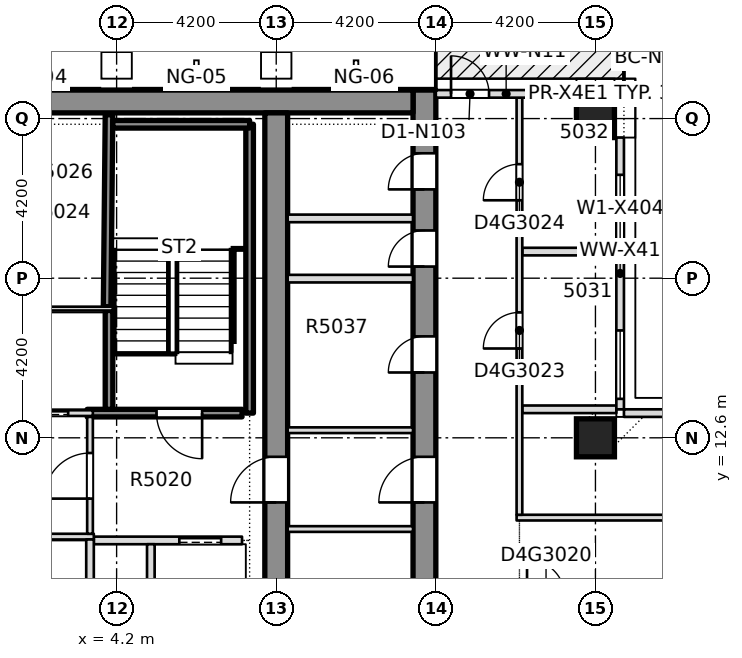
"""IFC4 building model, lengths in metres.
Left out: names, types, materials, properties, quantities, classifications, styles, units other than length and angle.
Written with IfcOpenShell. Run it as: python <this file> out.ifc"""

import sys

from ifc_helpers import new_model, si_unit, direction, frame, frame_2d, origin, origin_2d, place, context, subcontext, project, spatial, rectangle, extrude, element, fill, save


model = new_model("IFC4")
c1 = context("Model", 3, precision=1e-05, world=origin(), true_north=direction((0.0, 1.0)))
c2 = subcontext(c1, "Body", "Model", "MODEL_VIEW")
j1 = project(units=[si_unit("LENGTHUNIT", "METRE"), si_unit("PLANEANGLEUNIT", "RADIAN")], contexts=[c1])
p1 = place(None, origin())
s1 = spatial("IfcSite", under=j1, at=p1, CompositionType="ELEMENT")
p2 = place(p1, origin())
s2 = spatial("IfcBuilding", under=s1, at=p2, CompositionType="ELEMENT")
p3 = place(p2, frame((0.0, 0.0, 192.8)))
s3 = spatial("IfcBuildingStorey", under=s2, at=p3, CompositionType="ELEMENT", Elevation=192.8)
p4 = place(p3, frame((12.3, -8.4, -0.4), z_axis=(0.0, 0.0, 1.0), x_axis=(0.0, 1.0, 0.0)))
e1 = element("IfcWall", 1, at=p4, inside=s3, PredefinedType="SHEAR", context=c2, shape_type="SweptSolid", body=[
    extrude(rectangle(XDim=30.15, YDim=0.6, at=frame_2d((15.075, 0.0))), origin(), (0.0, 0.0, 1.0), 3.45),
])
p5 = place(p4, frame((5.083, 0.0, 0.4)))
e2 = element("IfcOpeningElement", 2, at=p5, cuts=e1, PredefinedType="OPENING", context=c2, shape_type="SweptSolid", body=[
    extrude(rectangle(XDim=0.95, YDim=2.1, at=frame_2d((0.475, 1.05))), frame((0.0, 0.31, 0.0), z_axis=(0.0, -1.0, 0.0), x_axis=(1.0, 0.0, 0.0)), (0.0, 0.0, 1.0), 0.62),
])
p6 = place(p4, frame((13.933, 0.0, 0.4)))
e3 = element("IfcOpeningElement", 3, at=p6, cuts=e1, PredefinedType="OPENING", context=c2, shape_type="SweptSolid", body=[
    extrude(rectangle(XDim=0.95, YDim=2.1, at=frame_2d((0.475, 1.05))), frame((0.0, 0.31, 0.0), z_axis=(0.0, -1.0, 0.0), x_axis=(1.0, 0.0, 0.0)), (0.0, 0.0, 1.0), 0.62),
])
p7 = place(p4, frame((22.719, 0.0, 0.4)))
e4 = element("IfcOpeningElement", 4, at=p7, cuts=e1, PredefinedType="OPENING", context=c2, shape_type="SweptSolid", body=[
    extrude(rectangle(XDim=0.95, YDim=2.1, at=frame_2d((0.475, 1.05))), frame((0.0, 0.31, 0.0), z_axis=(0.0, -1.0, 0.0), x_axis=(1.0, 0.0, 0.0)), (0.0, 0.0, 1.0), 0.62),
])
p8 = place(p4, frame((25.506, 0.0, 0.4)))
e5 = element("IfcOpeningElement", 5, at=p8, cuts=e1, PredefinedType="OPENING", context=c2, shape_type="SweptSolid", body=[
    extrude(rectangle(XDim=0.95, YDim=2.1, at=frame_2d((0.475, 1.05))), frame((0.0, 0.31, 0.0), z_axis=(0.0, -1.0, 0.0), x_axis=(1.0, 0.0, 0.0)), (0.0, 0.0, 1.0), 0.62),
])
p9 = place(p4, frame((27.537, 0.0, 0.4)))
e6 = element("IfcOpeningElement", 6, at=p9, cuts=e1, PredefinedType="OPENING", context=c2, shape_type="SweptSolid", body=[
    extrude(rectangle(XDim=0.95, YDim=2.1, at=frame_2d((0.475, 1.05))), frame((0.0, 0.31, 0.0), z_axis=(0.0, -1.0, 0.0), x_axis=(1.0, 0.0, 0.0)), (0.0, 0.0, 1.0), 0.62),
])
p10 = place(p4, frame((19.3, 0.0, 0.4)))
e7 = element("IfcOpeningElement", 7, at=p10, cuts=e1, PredefinedType="OPENING", context=c2, shape_type="SweptSolid", body=[
    extrude(rectangle(XDim=1.2, YDim=2.1, at=frame_2d((0.6, 1.05))), frame((0.0, 0.31, 0.0), z_axis=(0.0, -1.0, 0.0), x_axis=(1.0, 0.0, 0.0)), (0.0, 0.0, 1.0), 0.62),
])
p11 = place(p3, frame((-12.0, 21.45, -0.4), z_axis=(0.0, 0.0, 1.0), x_axis=(1.0, 0.0, 0.0)))
e8 = element("IfcWall", 8, at=p11, inside=s3, PredefinedType="SHEAR", context=c2, shape_type="SweptSolid", body=[
    extrude(rectangle(XDim=24.0, YDim=0.6, at=frame_2d((12.0, 0.0))), origin(), (0.0, 0.0, 1.0), 3.45),
])
p12 = place(p3, frame((8.4, -7.8, -0.4), z_axis=(0.0, 0.0, 1.0), x_axis=(0.0, 1.0, 0.0)))
e9 = element("IfcWall", 9, at=p12, inside=s3, PredefinedType="SHEAR", context=c2, shape_type="SweptSolid", body=[
    extrude(rectangle(XDim=28.95, YDim=0.6, at=frame_2d((14.475, 0.0))), origin(), (0.0, 0.0, 1.0), 3.45),
])
p13 = place(p12, frame((18.7, 0.0, 0.4)))
e10 = element("IfcOpeningElement", 10, at=p13, cuts=e9, PredefinedType="OPENING", context=c2, shape_type="SweptSolid", body=[
    extrude(rectangle(XDim=1.2, YDim=2.1, at=frame_2d((0.6, 1.05))), frame((0.0, 0.31, 0.0), z_axis=(0.0, -1.0, 0.0), x_axis=(1.0, 0.0, 0.0)), (0.0, 0.0, 1.0), 0.62),
])
for number, where, z_axis, x_axis in (
    (11, (16.8, 12.6, -0.4), (0.0, 0.0, 1.0), (1.0, 0.0, 0.0)),
    (12, (16.8, 21.0, -0.4), (0.0, 0.0, 1.0), (1.0, 0.0, 0.0)),
):
    element("IfcColumn", number, at=place(p3, frame(where, z_axis=z_axis, x_axis=x_axis)), inside=s3, PredefinedType="COLUMN", context=c2, shape_type="SweptSolid", body=[
        extrude(rectangle(XDim=1.0, YDim=1.0, at=origin_2d()), origin(), (0.0, 0.0, 1.0), 3.45),
    ])
p14 = place(p3, frame((14.725, 10.5, 0.0), z_axis=(0.0, 0.0, 1.0), x_axis=(1.0, 0.0, 0.0)))
e13 = element("IfcWall", 13, at=p14, inside=s3, PredefinedType="PARTITIONING", context=c2, shape_type="SweptSolid", body=[
    extrude(rectangle(XDim=11.025, YDim=0.15, at=frame_2d((5.512, 0.0))), origin(), (0.0, 0.0, 1.0), 3.05),
])
p15 = place(p14, frame((5.15, 0.0, 0.0)))
e14 = element("IfcOpeningElement", 14, at=p15, cuts=e13, PredefinedType="OPENING", context=c2, shape_type="SweptSolid", body=[
    extrude(rectangle(XDim=1.0, YDim=2.1, at=frame_2d((0.5, 1.05))), frame((0.0, 0.085, 0.0), z_axis=(0.0, -1.0, 0.0), x_axis=(1.0, 0.0, 0.0)), (0.0, 0.0, 1.0), 0.17),
])
for number, where, z_axis, x_axis in (
    (15, (14.875, 13.35, 0.0), (0.0, 0.0, 1.0), (1.0, 0.0, 0.0)),
    (16, (14.875, 17.5, 0.0), (0.0, 0.0, 1.0), (1.0, 0.0, 0.0)),
):
    element("IfcWall", number, at=place(p3, frame(where, z_axis=z_axis, x_axis=x_axis)), inside=s3, PredefinedType="PARTITIONING", context=c2, shape_type="SweptSolid", body=[
        extrude(rectangle(XDim=2.475, YDim=0.2, at=frame_2d((1.238, 0.0))), origin(), (0.0, 0.0, 1.0), 3.05),
    ])
p16 = place(p3, frame((14.8, 10.575, 0.0), z_axis=(0.0, 0.0, 1.0), x_axis=(0.0, 1.0, 0.0)))
e17 = element("IfcWall", 17, at=p16, inside=s3, PredefinedType="PARTITIONING", context=c2, shape_type="SweptSolid", body=[
    extrude(rectangle(XDim=10.975, YDim=0.15, at=frame_2d((5.488, 0.0))), origin(), (0.0, 0.0, 1.0), 3.05),
])
p17 = place(p16, frame((4.375, 0.0, 0.0)))
e18 = element("IfcOpeningElement", 18, at=p17, cuts=e17, PredefinedType="OPENING", context=c2, shape_type="SweptSolid", body=[
    extrude(rectangle(XDim=0.95, YDim=2.1, at=frame_2d((0.475, 1.05))), frame((0.0, 0.085, 0.0), z_axis=(0.0, -1.0, 0.0), x_axis=(1.0, 0.0, 0.0)), (0.0, 0.0, 1.0), 0.17),
])
p18 = place(p16, frame((8.275, 0.0, 0.0)))
e19 = element("IfcOpeningElement", 19, at=p18, cuts=e17, PredefinedType="OPENING", context=c2, shape_type="SweptSolid", body=[
    extrude(rectangle(XDim=0.95, YDim=2.1, at=frame_2d((0.475, 1.05))), frame((0.0, 0.085, 0.0), z_axis=(0.0, -1.0, 0.0), x_axis=(1.0, 0.0, 0.0)), (0.0, 0.0, 1.0), 0.17),
])
p19 = place(p3, frame((24.7, 13.25, 0.0), z_axis=(0.0, 0.0, 1.0), x_axis=(-1.0, 0.0, 0.0)))
e20 = element("IfcWall", 20, at=p19, inside=s3, PredefinedType="STANDARD", context=c2, shape_type="SweptSolid", body=[
    extrude(rectangle(XDim=7.15, YDim=0.2, at=frame_2d((3.575, 0.0))), origin(), (0.0, 0.0, 1.0), 3.05),
])
p20 = place(p3, frame((17.45, 13.35, 0.0), z_axis=(0.0, 0.0, 1.0), x_axis=(0.0, 1.0, 0.0)))
e21 = element("IfcWall", 21, at=p20, inside=s3, PredefinedType="STANDARD", context=c2, shape_type="SweptSolid", body=[
    extrude(rectangle(XDim=7.15, YDim=0.2, at=frame_2d((3.575, 0.0))), origin(), (0.0, 0.0, 1.0), 3.05),
])
p21 = place(p20, frame((0.275, 0.0, 0.2)))
e22 = element("IfcOpeningElement", 22, at=p21, cuts=e21, PredefinedType="OPENING", context=c2, shape_type="SweptSolid", body=[
    extrude(rectangle(XDim=1.8, YDim=2.65, at=frame_2d((0.9, 1.325))), frame((0.0, 0.11, 0.0), z_axis=(0.0, -1.0, 0.0), x_axis=(1.0, 0.0, 0.0)), (0.0, 0.0, 1.0), 0.22),
])
p22 = place(p20, frame((4.37, 0.0, 0.2)))
e23 = element("IfcOpeningElement", 23, at=p22, cuts=e21, PredefinedType="OPENING", context=c2, shape_type="SweptSolid", body=[
    extrude(rectangle(XDim=1.8, YDim=2.65, at=frame_2d((0.9, 1.325))), frame((0.0, 0.11, 0.0), z_axis=(0.0, -1.0, 0.0), x_axis=(1.0, 0.0, 0.0)), (0.0, 0.0, 1.0), 0.22),
])
p23 = place(p3, frame((16.3, 21.65, 0.0), z_axis=(0.0, 0.0, 1.0), x_axis=(-1.0, 0.0, 0.0)))
e24 = element("IfcWall", 24, at=p23, inside=s3, PredefinedType="STANDARD", context=c2, shape_type="SweptSolid", body=[
    extrude(rectangle(XDim=3.7, YDim=0.2, at=frame_2d((1.85, 0.0))), origin(), (0.0, 0.0, 1.0), 3.05),
])
p24 = place(p23, frame((2.3, 0.0, 0.0)))
e25 = element("IfcOpeningElement", 25, at=p24, cuts=e24, PredefinedType="OPENING", context=c2, shape_type="SweptSolid", body=[
    extrude(rectangle(XDim=1.0, YDim=2.4, at=frame_2d((0.5, 1.2))), frame((0.0, 0.11, 0.0), z_axis=(0.0, -1.0, 0.0), x_axis=(1.0, 0.0, 0.0)), (0.0, 0.0, 1.0), 0.22),
])
p25 = place(p3, frame((3.6, 9.9, 0.0), z_axis=(0.0, 0.0, 1.0), x_axis=(1.0, 0.0, 0.0)))
e26 = element("IfcWall", 26, at=p25, inside=s3, PredefinedType="PARTITIONING", context=c2, shape_type="SweptSolid", body=[
    extrude(rectangle(XDim=3.9, YDim=0.2, at=frame_2d((1.95, 0.0))), origin(), (0.0, 0.0, 1.0), 3.05),
])
p26 = place(p25, frame((2.25, 0.0, 0.0)))
e27 = element("IfcOpeningElement", 27, at=p26, cuts=e26, PredefinedType="OPENING", context=c2, shape_type="SweptSolid", body=[
    extrude(rectangle(XDim=1.1, YDim=2.1, at=frame_2d((0.55, 1.05))), frame((0.0, 0.11, 0.0), z_axis=(0.0, -1.0, 0.0), x_axis=(1.0, 0.0, 0.0)), (0.0, 0.0, 1.0), 0.22),
])
p27 = place(p3, frame((-3.6, 10.0, 0.0), z_axis=(0.0, 0.0, 1.0), x_axis=(1.0, 0.0, 0.0)))
e28 = element("IfcWall", 28, at=p27, inside=s3, PredefinedType="PARTITIONING", context=c2, shape_type="SweptSolid", body=[
    extrude(rectangle(XDim=7.2, YDim=0.15, at=frame_2d((3.6, 0.0))), origin(), (0.0, 0.0, 1.0), 3.05),
])
p28 = place(p27, frame((2.9, 0.0, 0.0)))
e29 = element("IfcOpeningElement", 29, at=p28, cuts=e28, PredefinedType="OPENING", context=c2, shape_type="SweptSolid", body=[
    extrude(rectangle(XDim=1.4, YDim=2.1, at=frame_2d((0.7, 1.05))), frame((0.0, 0.085, 0.0), z_axis=(0.0, -1.0, 0.0), x_axis=(1.0, 0.0, 0.0)), (0.0, 0.0, 1.0), 0.17),
])
p29 = place(p3, frame((-3.575, 13.25, 0.0), z_axis=(0.0, 0.0, 1.0), x_axis=(1.0, 0.0, 0.0)))
e30 = element("IfcWall", 30, at=p29, inside=s3, PredefinedType="PARTITIONING", context=c2, shape_type="SweptSolid", body=[
    extrude(rectangle(XDim=7.15, YDim=0.15, at=frame_2d((3.575, 0.0))), origin(), (0.0, 0.0, 1.0), 3.05),
])
p30 = place(p29, frame((0.6, 0.0, 0.0)))
e31 = element("IfcOpeningElement", 31, at=p30, cuts=e30, PredefinedType="OPENING", context=c2, shape_type="SweptSolid", body=[
    extrude(rectangle(XDim=1.2, YDim=2.1, at=frame_2d((0.6, 1.05))), frame((0.0, 0.085, 0.0), z_axis=(0.0, -1.0, 0.0), x_axis=(1.0, 0.0, 0.0)), (0.0, 0.0, 1.0), 0.17),
])
p31 = place(p29, frame((5.4, 0.0, 0.0)))
e32 = element("IfcOpeningElement", 32, at=p31, cuts=e30, PredefinedType="OPENING", context=c2, shape_type="SweptSolid", body=[
    extrude(rectangle(XDim=1.1, YDim=2.1, at=frame_2d((0.55, 1.05))), frame((0.0, 0.085, 0.0), z_axis=(0.0, -1.0, 0.0), x_axis=(1.0, 0.0, 0.0)), (0.0, 0.0, 1.0), 0.17),
])
p32 = place(p29, frame((2.975, 0.0, 0.0)))
e33 = element("IfcOpeningElement", 33, at=p32, cuts=e30, PredefinedType="OPENING", context=c2, shape_type="SweptSolid", body=[
    extrude(rectangle(XDim=1.2, YDim=2.1, at=frame_2d((0.6, 1.05))), frame((0.0, 0.085, 0.0), z_axis=(0.0, -1.0, 0.0), x_axis=(1.0, 0.0, 0.0)), (0.0, 0.0, 1.0), 0.17),
])
p33 = place(p3, frame((3.425, 13.25, 0.0), z_axis=(0.0, 0.0, 1.0), x_axis=(1.0, 0.0, 0.0)))
e34 = element("IfcWall", 34, at=p33, inside=s3, PredefinedType="SOLIDWALL", context=c2, shape_type="SweptSolid", body=[
    extrude(rectangle(XDim=4.075, YDim=0.2, at=frame_2d((2.038, 0.0))), origin(), (0.0, 0.0, 1.0), 3.05),
])
p34 = place(p33, frame((1.825, 0.0, 0.0)))
e35 = element("IfcOpeningElement", 35, at=p34, cuts=e34, PredefinedType="OPENING", context=c2, shape_type="SweptSolid", body=[
    extrude(rectangle(XDim=1.2, YDim=2.1, at=frame_2d((0.6, 1.05))), frame((0.0, 0.11, 0.0), z_axis=(0.0, -1.0, 0.0), x_axis=(1.0, 0.0, 0.0)), (0.0, 0.0, 1.0), 0.22),
])
p35 = place(p3, frame((0.65, 16.0, 0.0), z_axis=(0.0, 0.0, 1.0), x_axis=(1.0, 0.0, 0.0)))
e36 = element("IfcWall", 36, at=p35, inside=s3, PredefinedType="PARTITIONING", context=c2, shape_type="SweptSolid", body=[
    extrude(rectangle(XDim=3.45, YDim=0.1, at=frame_2d((1.725, 0.0))), origin(), (0.0, 0.0, 1.0), 3.05),
])
p36 = place(p3, frame((3.5, 7.075, 0.0), z_axis=(0.0, 0.0, 1.0), x_axis=(0.0, 1.0, 0.0)))
e37 = element("IfcWall", 37, at=p36, inside=s3, PredefinedType="PARTITIONING", context=c2, shape_type="SweptSolid", body=[
    extrude(rectangle(XDim=2.85, YDim=0.2, at=frame_2d((1.425, 0.0))), origin(), (0.0, 0.0, 1.0), 3.05),
])
p37 = place(p3, frame((3.5, 10.075, 0.0), z_axis=(0.0, 0.0, 1.0), x_axis=(0.0, 1.0, 0.0)))
e38 = element("IfcWall", 38, at=p37, inside=s3, PredefinedType="PARTITIONING", context=c2, shape_type="SweptSolid", body=[
    extrude(rectangle(XDim=3.075, YDim=0.15, at=frame_2d((1.538, 0.0))), origin(), (0.0, 0.0, 1.0), 3.05),
])
p38 = place(p37, frame((0.925, 0.0, 0.0)))
e39 = element("IfcOpeningElement", 39, at=p38, cuts=e38, PredefinedType="OPENING", context=c2, shape_type="SweptSolid", body=[
    extrude(rectangle(XDim=1.2, YDim=2.1, at=frame_2d((0.6, 1.05))), frame((0.0, 0.085, 0.0), z_axis=(0.0, -1.0, 0.0), x_axis=(1.0, 0.0, 0.0)), (0.0, 0.0, 1.0), 0.17),
])
p39 = place(p3, frame((4.0, 13.35, 0.0), z_axis=(0.0, 0.0, 1.0), x_axis=(0.0, 1.0, 0.0)))
e40 = element("IfcWall", 40, at=p39, inside=s3, PredefinedType="SOLIDWALL", context=c2, shape_type="SweptSolid", body=[
    extrude(rectangle(XDim=2.6, YDim=0.2, at=frame_2d((1.3, 0.0))), origin(), (0.0, 0.0, 1.0), 3.05),
])
p40 = place(p3, frame((3.95, 16.05, 0.0), z_axis=(0.0, 0.0, 1.0), x_axis=(0.009911993103, 0.99995087499, 0.0)))
e41 = element("IfcWall", 41, at=p40, inside=s3, PredefinedType="SOLIDWALL", context=c2, shape_type="SweptSolid", body=[
    extrude(rectangle(XDim=5.049, YDim=0.2, at=frame_2d((2.525, 0.0))), origin(), (0.0, 0.0, 1.0), 3.05),
])
p41 = place(p3, frame((5.1, 7.075, 0.0), z_axis=(0.0, 0.0, 1.0), x_axis=(0.0, 1.0, 0.0)))
e42 = element("IfcWall", 42, at=p41, inside=s3, PredefinedType="PARTITIONING", context=c2, shape_type="SweptSolid", body=[
    extrude(rectangle(XDim=2.725, YDim=0.2, at=frame_2d((1.363, 0.0))), origin(), (0.0, 0.0, 1.0), 3.05),
])
for number, where, z_axis, x_axis in (
    (43, (8.701, 10.2, 0.0), (0.0, 0.0, 1.0), (1.0, 0.0, 0.0)),
    (44, (8.701, 12.8, 0.0), (0.0, 0.0, 1.0), (1.0, 0.0, 0.0)),
):
    element("IfcWall", number, at=place(p3, frame(where, z_axis=z_axis, x_axis=x_axis)), inside=s3, PredefinedType="PARTITIONING", context=c2, shape_type="SweptSolid", body=[
        extrude(rectangle(XDim=3.298, YDim=0.15, at=frame_2d((1.649, 0.0))), origin(), (0.0, 0.0, 1.0), 3.05),
    ])
for number, where, z_axis, x_axis in (
    (45, (8.701, 16.788, 0.0), (0.0, 0.0, 1.0), (1.0, 0.0, 0.0)),
    (46, (8.701, 18.373, 0.0), (0.0, 0.0, 1.0), (1.0, 0.0, 0.0)),
):
    element("IfcWall", number, at=place(p3, frame(where, z_axis=z_axis, x_axis=x_axis)), inside=s3, PredefinedType="PARTITIONING", context=c2, shape_type="SweptSolid", body=[
        extrude(rectangle(XDim=3.298, YDim=0.2, at=frame_2d((1.649, 0.0))), origin(), (0.0, 0.0, 1.0), 3.05),
    ])
p42 = place(p3, frame((7.7, 13.25, 0.0), z_axis=(0.0, 0.0, 1.0), x_axis=(0.0, 1.0, 0.0)))
e47 = element("IfcWall", 47, at=p42, inside=s3, PredefinedType="SOLIDWALL", context=c2, shape_type="SweptSolid", body=[
    extrude(rectangle(XDim=7.6, YDim=0.2, at=frame_2d((3.8, 0.0))), origin(), (0.0, 0.0, 1.0), 3.05),
])
p43 = place(p3, frame((4.1, 20.85, 0.0), z_axis=(0.0, 0.0, 1.0), x_axis=(1.0, 0.0, 0.0)))
e48 = element("IfcWall", 48, at=p43, inside=s3, PredefinedType="SOLIDWALL", context=c2, shape_type="SweptSolid", body=[
    extrude(rectangle(XDim=3.6, YDim=0.2, at=frame_2d((1.8, 0.0))), origin(), (0.0, 0.0, 1.0), 3.05),
])
p44 = place(p17, origin())
e49 = element("IfcDoor", 49, at=p44, inside=s3, OperationType="SINGLE_SWING_RIGHT", PredefinedType="DOOR", context=c2, shape_type="SweptSolid", body=[
    extrude(rectangle(XDim=0.95, YDim=2.1, at=frame_2d((0.475, 1.05))), frame((0.0, 0.025, 0.0), z_axis=(0.0, -1.0, 0.0), x_axis=(1.0, 0.0, 0.0)), (0.0, 0.0, 1.0), 0.05),
])
fill(e18, e49)
p45 = place(p18, origin())
e50 = element("IfcDoor", 50, at=p45, inside=s3, OperationType="SINGLE_SWING_LEFT", PredefinedType="DOOR", context=c2, shape_type="SweptSolid", body=[
    extrude(rectangle(XDim=0.95, YDim=2.1, at=frame_2d((0.475, 1.05))), frame((0.0, 0.025, 0.0), z_axis=(0.0, -1.0, 0.0), x_axis=(1.0, 0.0, 0.0)), (0.0, 0.0, 1.0), 0.05),
])
fill(e19, e50)
p46 = place(p21, origin())
e51 = element("IfcWindow", 51, at=p46, inside=s3, PartitioningType="SINGLE_PANEL", PredefinedType="WINDOW", context=c2, shape_type="SweptSolid", body=[
    extrude(rectangle(XDim=1.8, YDim=2.65, at=frame_2d((0.9, 1.325))), frame((0.0, 0.03, 0.0), z_axis=(0.0, -1.0, 0.0), x_axis=(1.0, 0.0, 0.0)), (0.0, 0.0, 1.0), 0.06),
])
fill(e22, e51)
p47 = place(p22, origin())
e52 = element("IfcWindow", 52, at=p47, inside=s3, PartitioningType="SINGLE_PANEL", PredefinedType="WINDOW", context=c2, shape_type="SweptSolid", body=[
    extrude(rectangle(XDim=1.8, YDim=2.65, at=frame_2d((0.9, 1.325))), frame((0.0, 0.03, 0.0), z_axis=(0.0, -1.0, 0.0), x_axis=(1.0, 0.0, 0.0)), (0.0, 0.0, 1.0), 0.06),
])
fill(e23, e52)
p48 = place(p24, origin())
e53 = element("IfcDoor", 53, at=p48, inside=s3, OperationType="SINGLE_SWING_LEFT", PredefinedType="DOOR", context=c2, shape_type="SweptSolid", body=[
    extrude(rectangle(XDim=1.0, YDim=2.4, at=frame_2d((0.5, 1.2))), frame((0.0, 0.025, 0.0), z_axis=(0.0, -1.0, 0.0), x_axis=(1.0, 0.0, 0.0)), (0.0, 0.0, 1.0), 0.05),
])
fill(e25, e53)
p49 = place(p34, origin())
e54 = element("IfcDoor", 54, at=p49, inside=s3, OperationType="SINGLE_SWING_RIGHT", PredefinedType="DOOR", context=c2, shape_type="SweptSolid", body=[
    extrude(rectangle(XDim=1.2, YDim=2.1, at=frame_2d((0.6, 1.05))), frame((0.0, 0.025, 0.0), z_axis=(0.0, -1.0, 0.0), x_axis=(1.0, 0.0, 0.0)), (0.0, 0.0, 1.0), 0.05),
])
fill(e35, e54)
p50 = place(p26, origin())
e55 = element("IfcDoor", 55, at=p50, inside=s3, OperationType="SLIDING_TO_LEFT", PredefinedType="DOOR", context=c2, shape_type="SweptSolid", body=[
    extrude(rectangle(XDim=1.1, YDim=2.1, at=frame_2d((0.55, 1.05))), frame((0.0, 0.025, 0.0), z_axis=(0.0, -1.0, 0.0), x_axis=(1.0, 0.0, 0.0)), (0.0, 0.0, 1.0), 0.05),
])
fill(e27, e55)
p51 = place(p31, origin())
e56 = element("IfcDoor", 56, at=p51, inside=s3, OperationType="SLIDING_TO_LEFT", PredefinedType="DOOR", context=c2, shape_type="SweptSolid", body=[
    extrude(rectangle(XDim=1.1, YDim=2.1, at=frame_2d((0.55, 1.05))), frame((0.0, 0.025, 0.0), z_axis=(0.0, -1.0, 0.0), x_axis=(1.0, 0.0, 0.0)), (0.0, 0.0, 1.0), 0.05),
])
fill(e32, e56)
p52 = place(p38, origin())
e57 = element("IfcDoor", 57, at=p52, inside=s3, OperationType="SINGLE_SWING_LEFT", PredefinedType="DOOR", context=c2, shape_type="SweptSolid", body=[
    extrude(rectangle(XDim=1.2, YDim=2.1, at=frame_2d((0.6, 1.05))), frame((0.0, 0.025, 0.0), z_axis=(0.0, -1.0, 0.0), x_axis=(1.0, 0.0, 0.0)), (0.0, 0.0, 1.0), 0.05),
])
fill(e39, e57)
p53 = place(p7, origin())
e58 = element("IfcDoor", 58, at=p53, inside=s3, OperationType="SINGLE_SWING_LEFT", PredefinedType="DOOR", context=c2, shape_type="SweptSolid", body=[
    extrude(rectangle(XDim=0.95, YDim=2.1, at=frame_2d((0.475, 1.05))), frame((0.0, 0.025, 0.0), z_axis=(0.0, -1.0, 0.0), x_axis=(1.0, 0.0, 0.0)), (0.0, 0.0, 1.0), 0.05),
])
fill(e4, e58)
p54 = place(p8, origin())
e59 = element("IfcDoor", 59, at=p54, inside=s3, OperationType="SINGLE_SWING_LEFT", PredefinedType="DOOR", context=c2, shape_type="SweptSolid", body=[
    extrude(rectangle(XDim=0.95, YDim=2.1, at=frame_2d((0.475, 1.05))), frame((0.0, 0.025, 0.0), z_axis=(0.0, -1.0, 0.0), x_axis=(1.0, 0.0, 0.0)), (0.0, 0.0, 1.0), 0.05),
])
fill(e5, e59)
p55 = place(p9, origin())
e60 = element("IfcDoor", 60, at=p55, inside=s3, OperationType="SINGLE_SWING_LEFT", PredefinedType="DOOR", context=c2, shape_type="SweptSolid", body=[
    extrude(rectangle(XDim=0.95, YDim=2.1, at=frame_2d((0.475, 1.05))), frame((0.0, 0.025, 0.0), z_axis=(0.0, -1.0, 0.0), x_axis=(1.0, 0.0, 0.0)), (0.0, 0.0, 1.0), 0.05),
])
fill(e6, e60)
p56 = place(p10, origin())
e61 = element("IfcDoor", 61, at=p56, inside=s3, OperationType="SINGLE_SWING_LEFT", PredefinedType="DOOR", context=c2, shape_type="SweptSolid", body=[
    extrude(rectangle(XDim=1.2, YDim=2.1, at=frame_2d((0.6, 1.05))), frame((0.0, 0.025, 0.0), z_axis=(0.0, -1.0, 0.0), x_axis=(1.0, 0.0, 0.0)), (0.0, 0.0, 1.0), 0.05),
])
fill(e7, e61)
p57 = place(p13, origin())
e62 = element("IfcDoor", 62, at=p57, inside=s3, OperationType="SINGLE_SWING_LEFT", PredefinedType="DOOR", context=c2, shape_type="SweptSolid", body=[
    extrude(rectangle(XDim=1.2, YDim=2.1, at=frame_2d((0.6, 1.05))), frame((0.0, 0.025, 0.0), z_axis=(0.0, -1.0, 0.0), x_axis=(1.0, 0.0, 0.0)), (0.0, 0.0, 1.0), 0.05),
])
fill(e10, e62)
save(model, sys.argv[1])
